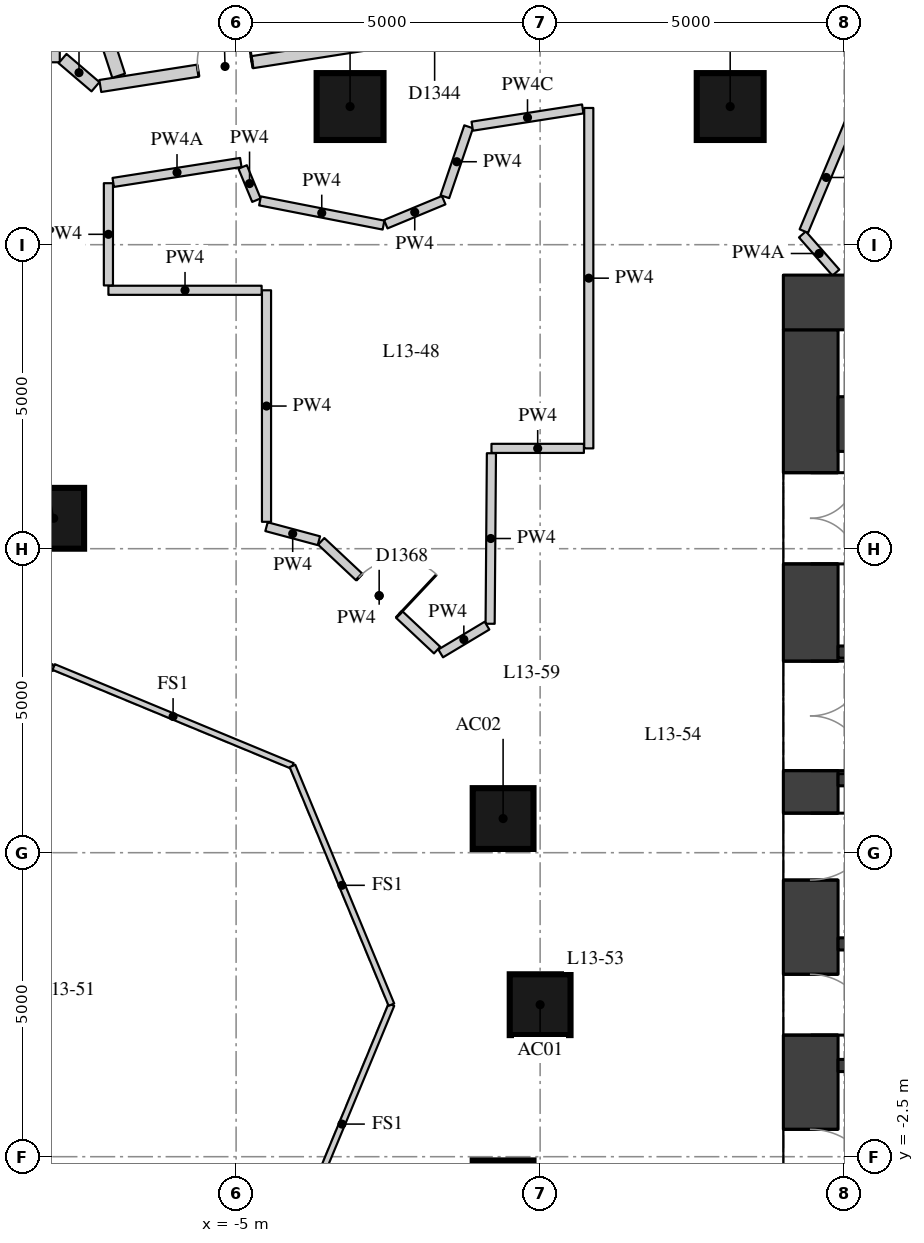
"""IFC4 building model, lengths in metres.
Left out: names, types, materials, properties, quantities, classifications, styles, units other than length and angle.
Written with IfcOpenShell. Run it as: python <this file> out.ifc"""

import sys

from ifc_helpers import new_model, si_unit, direction, frame, frame_2d, origin, origin_2d, place, context, subcontext, project, spatial, rectangle, extrude, element, fill, save


model = new_model("IFC4")
c1 = context("Model", 3, precision=1e-05, world=origin(), true_north=direction((0.0, 1.0)))
c2 = subcontext(c1, "Body", "Model", "MODEL_VIEW")
j1 = project(units=[si_unit("LENGTHUNIT", "METRE"), si_unit("PLANEANGLEUNIT", "RADIAN")], contexts=[c1])
p1 = place(None, origin())
s1 = spatial("IfcSite", under=j1, at=p1, CompositionType="ELEMENT")
p2 = place(p1, origin())
s2 = spatial("IfcBuilding", under=s1, at=p2, CompositionType="ELEMENT")
p3 = place(p2, frame((0.0, 0.0, 51.4)))
s3 = spatial("IfcBuildingStorey", under=s2, at=p3, CompositionType="ELEMENT", Elevation=51.4)
for number, where, z_axis, x_axis in (
    (1, (0.0, 0.0, 0.0), (0.0, 0.0, 1.0), (1.0, 0.0, 0.0)),
    (2, (-0.609, 3.062, 0.0), (0.0, 0.0, 1.0), (1.0, 0.0, 0.0)),
    (3, (-8.0, 8.0, 0.0), (0.0, 0.0, 1.0), (1.0, 0.0, 0.0)),
    (4, (-0.609, -3.062, 0.0), (0.0, 0.0, 1.0), (1.0, 0.0, 0.0)),
):
    element("IfcColumn", number, at=place(p3, frame(where, z_axis=z_axis, x_axis=x_axis)), inside=s3, PredefinedType="COLUMN", context=c2, shape_type="SweptSolid", body=[
        extrude(rectangle(XDim=1.0, YDim=1.0, at=origin_2d()), origin(), (0.0, 0.0, 1.0), 3.3),
    ])
for number, where, z_axis, x_axis in (
    (5, (3.126, 14.772, 0.0), (0.0, 0.0, 1.0), (1.0, 0.0, 0.0)),
    (6, (-3.126, 14.772, 0.0), (0.0, 0.0, 1.0), (1.0, 0.0, 0.0)),
):
    element("IfcColumn", number, at=place(p3, frame(where, z_axis=z_axis, x_axis=x_axis)), inside=s3, PredefinedType="COLUMN", context=c2, shape_type="SweptSolid", body=[
        extrude(rectangle(XDim=1.1, YDim=1.1, at=origin_2d()), origin(), (0.0, 0.0, 1.0), 3.3),
    ])
p4 = place(p3, frame((4.45, -11.1, 0.0), z_axis=(0.0, 0.0, 1.0), x_axis=(0.0, 1.0, 0.0)))
e7 = element("IfcWall", 7, at=p4, inside=s3, PredefinedType="SHEAR", context=c2, shape_type="SweptSolid", body=[
    extrude(rectangle(XDim=22.2, YDim=0.9, at=frame_2d((11.1, 0.0))), origin(), (0.0, 0.0, 1.0), 3.02),
])
p5 = place(p4, frame((2.35, 0.0, 0.0)))
e8 = element("IfcOpeningElement", 8, at=p5, cuts=e7, PredefinedType="OPENING", context=c2, shape_type="SweptSolid", body=[
    extrude(rectangle(XDim=1.5, YDim=2.1, at=frame_2d((0.75, 1.05))), frame((0.0, 0.46, 0.0), z_axis=(0.0, -1.0, 0.0), x_axis=(1.0, 0.0, 0.0)), (0.0, 0.0, 1.0), 0.92),
])
p6 = place(p4, frame((5.45, 0.0, 0.0)))
e9 = element("IfcOpeningElement", 9, at=p6, cuts=e7, PredefinedType="OPENING", context=c2, shape_type="SweptSolid", body=[
    extrude(rectangle(XDim=1.8, YDim=2.1, at=frame_2d((0.9, 1.05))), frame((0.0, 0.46, 0.0), z_axis=(0.0, -1.0, 0.0), x_axis=(1.0, 0.0, 0.0)), (0.0, 0.0, 1.0), 0.92),
])
p7 = place(p4, frame((7.95, 0.0, 0.0)))
e10 = element("IfcOpeningElement", 10, at=p7, cuts=e7, PredefinedType="OPENING", context=c2, shape_type="SweptSolid", body=[
    extrude(rectangle(XDim=1.1, YDim=2.1, at=frame_2d((0.55, 1.05))), frame((0.0, 0.46, 0.0), z_axis=(0.0, -1.0, 0.0), x_axis=(1.0, 0.0, 0.0)), (0.0, 0.0, 1.0), 0.92),
])
p8 = place(p4, frame((10.6, 0.0, 0.0)))
e11 = element("IfcOpeningElement", 11, at=p8, cuts=e7, PredefinedType="OPENING", context=c2, shape_type="SweptSolid", body=[
    extrude(rectangle(XDim=1.0, YDim=2.1, at=frame_2d((0.5, 1.05))), frame((0.0, 0.46, 0.0), z_axis=(0.0, -1.0, 0.0), x_axis=(1.0, 0.0, 0.0)), (0.0, 0.0, 1.0), 0.92),
])
p9 = place(p4, frame((13.15, 0.0, 0.0)))
e12 = element("IfcOpeningElement", 12, at=p9, cuts=e7, PredefinedType="OPENING", context=c2, shape_type="SweptSolid", body=[
    extrude(rectangle(XDim=1.1, YDim=2.1, at=frame_2d((0.55, 1.05))), frame((0.0, 0.46, 0.0), z_axis=(0.0, -1.0, 0.0), x_axis=(1.0, 0.0, 0.0)), (0.0, 0.0, 1.0), 0.92),
])
p10 = place(p4, frame((14.95, 0.0, 0.0)))
e13 = element("IfcOpeningElement", 13, at=p10, cuts=e7, PredefinedType="OPENING", context=c2, shape_type="SweptSolid", body=[
    extrude(rectangle(XDim=1.8, YDim=2.1, at=frame_2d((0.9, 1.05))), frame((0.0, 0.46, 0.0), z_axis=(0.0, -1.0, 0.0), x_axis=(1.0, 0.0, 0.0)), (0.0, 0.0, 1.0), 0.92),
])
p11 = place(p4, frame((18.35, 0.0, 0.0)))
e14 = element("IfcOpeningElement", 14, at=p11, cuts=e7, PredefinedType="OPENING", context=c2, shape_type="SweptSolid", body=[
    extrude(rectangle(XDim=1.5, YDim=2.1, at=frame_2d((0.75, 1.05))), frame((0.0, 0.46, 0.0), z_axis=(0.0, -1.0, 0.0), x_axis=(1.0, 0.0, 0.0)), (0.0, 0.0, 1.0), 0.92),
])
p12 = place(p3, frame((4.0, 11.55, 0.0), z_axis=(0.0, 0.0, 1.0), x_axis=(1.0, 0.0, 0.0)))
e15 = element("IfcWall", 15, at=p12, inside=s3, PredefinedType="SHEAR", context=c2, shape_type="SweptSolid", body=[
    extrude(rectangle(XDim=15.2, YDim=0.9, at=frame_2d((7.6, 0.0))), origin(), (0.0, 0.0, 1.0), 3.02),
])
p13 = place(p3, frame((4.9, 9.55, 0.0), z_axis=(0.0, 0.0, 1.0), x_axis=(1.0, 0.0, 0.0)))
e16 = element("IfcWall", 16, at=p13, inside=s3, PredefinedType="SHEAR", context=c2, shape_type="SweptSolid", body=[
    extrude(rectangle(XDim=10.2, YDim=0.9, at=frame_2d((5.1, 0.0))), origin(), (0.0, 0.0, 1.0), 3.02),
])
p14 = place(p3, frame((4.9, 5.8, 0.0), z_axis=(0.0, 0.0, 1.0), x_axis=(1.0, 0.0, 0.0)))
e17 = element("IfcWall", 17, at=p14, inside=s3, PredefinedType="SHEAR", context=c2, shape_type="SweptSolid", body=[
    extrude(rectangle(XDim=10.2, YDim=0.2, at=frame_2d((5.1, 0.0))), origin(), (0.0, 0.0, 1.0), 3.02),
])
p15 = place(p14, frame((6.75, 0.0, 0.0)))
e18 = element("IfcOpeningElement", 18, at=p15, cuts=e17, PredefinedType="OPENING", context=c2, shape_type="SweptSolid", body=[
    extrude(rectangle(XDim=1.1, YDim=2.1, at=frame_2d((0.55, 1.05))), frame((0.0, 0.11, 0.0), z_axis=(0.0, -1.0, 0.0), x_axis=(1.0, 0.0, 0.0)), (0.0, 0.0, 1.0), 0.22),
])
p16 = place(p14, frame((8.75, 0.0, 0.0)))
e19 = element("IfcOpeningElement", 19, at=p16, cuts=e17, PredefinedType="OPENING", context=c2, shape_type="SweptSolid", body=[
    extrude(rectangle(XDim=1.1, YDim=2.1, at=frame_2d((0.55, 1.05))), frame((0.0, 0.11, 0.0), z_axis=(0.0, -1.0, 0.0), x_axis=(1.0, 0.0, 0.0)), (0.0, 0.0, 1.0), 0.22),
])
p17 = place(p3, frame((4.9, 3.7, 0.0), z_axis=(0.0, 0.0, 1.0), x_axis=(1.0, 0.0, 0.0)))
e20 = element("IfcWall", 20, at=p17, inside=s3, PredefinedType="SHEAR", context=c2, shape_type="SweptSolid", body=[
    extrude(rectangle(XDim=10.2, YDim=0.2, at=frame_2d((5.1, 0.0))), origin(), (0.0, 0.0, 1.0), 3.02),
])
p18 = place(p17, frame((6.3, 0.0, 0.0)))
e21 = element("IfcOpeningElement", 21, at=p18, cuts=e20, PredefinedType="OPENING", context=c2, shape_type="SweptSolid", body=[
    extrude(rectangle(XDim=1.1, YDim=2.1, at=frame_2d((0.55, 1.05))), frame((0.0, 0.11, 0.0), z_axis=(0.0, -1.0, 0.0), x_axis=(1.0, 0.0, 0.0)), (0.0, 0.0, 1.0), 0.22),
])
p19 = place(p17, frame((8.6, 0.0, 0.0)))
e22 = element("IfcOpeningElement", 22, at=p19, cuts=e20, PredefinedType="OPENING", context=c2, shape_type="SweptSolid", body=[
    extrude(rectangle(XDim=1.1, YDim=2.1, at=frame_2d((0.55, 1.05))), frame((0.0, 0.11, 0.0), z_axis=(0.0, -1.0, 0.0), x_axis=(1.0, 0.0, 0.0)), (0.0, 0.0, 1.0), 0.22),
])
for number, where, z_axis, x_axis in (
    (23, (4.9, 1.0, 0.0), (0.0, 0.0, 1.0), (1.0, 0.0, 0.0)),
    (24, (4.9, -1.0, 0.0), (0.0, 0.0, 1.0), (1.0, 0.0, 0.0)),
):
    element("IfcWall", number, at=place(p3, frame(where, z_axis=z_axis, x_axis=x_axis)), inside=s3, PredefinedType="SHEAR", context=c2, shape_type="SweptSolid", body=[
        extrude(rectangle(XDim=10.2, YDim=0.2, at=frame_2d((5.1, 0.0))), origin(), (0.0, 0.0, 1.0), 3.02),
    ])
p20 = place(p3, frame((-15.531, 15.6, 0.0), z_axis=(0.0, 0.0, 1.0), x_axis=(1.0, 0.0, 0.0)))
e25 = element("IfcWall", 25, at=p20, inside=s3, PredefinedType="PARTITIONING", context=c2, shape_type="SweptSolid", body=[
    extrude(rectangle(XDim=7.632, YDim=0.2, at=frame_2d((3.816, 0.0))), origin(), (0.0, 0.0, 1.0), 3.02),
])
p21 = place(p20, frame((5.283, 0.0, 0.0)))
e26 = element("IfcOpeningElement", 26, at=p21, cuts=e25, PredefinedType="OPENING", context=c2, shape_type="SweptSolid", body=[
    extrude(rectangle(XDim=1.0, YDim=2.1, at=frame_2d((0.5, 1.05))), frame((0.0, 0.11, 0.0), z_axis=(0.0, -1.0, 0.0), x_axis=(1.0, 0.0, 0.0)), (0.0, 0.0, 1.0), 0.22),
])
p22 = place(p20, frame((0.451, 0.0, 0.0)))
e27 = element("IfcOpeningElement", 27, at=p22, cuts=e25, PredefinedType="OPENING", context=c2, shape_type="SweptSolid", body=[
    extrude(rectangle(XDim=1.1, YDim=2.1, at=frame_2d((0.55, 1.05))), frame((0.0, 0.11, 0.0), z_axis=(0.0, -1.0, 0.0), x_axis=(1.0, 0.0, 0.0)), (0.0, 0.0, 1.0), 0.22),
])
p23 = place(p3, frame((-7.854, 15.561, 0.0), z_axis=(0.0, 0.0, 1.0), x_axis=(0.759763914627, -0.650199041856, 0.0)))
e28 = element("IfcWall", 28, at=p23, inside=s3, PredefinedType="PARTITIONING", context=c2, shape_type="SweptSolid", body=[
    extrude(rectangle(XDim=0.713, YDim=0.2, at=frame_2d((0.356, 0.0))), origin(), (0.0, 0.0, 1.0), 3.02),
])
p24 = place(p3, frame((-7.234, 15.11, 0.0), z_axis=(0.0, 0.0, 1.0), x_axis=(0.987957763282, 0.154723811906, 0.0)))
e29 = element("IfcWall", 29, at=p24, inside=s3, PredefinedType="PARTITIONING", context=c2, shape_type="SweptSolid", body=[
    extrude(rectangle(XDim=11.012, YDim=0.2, at=frame_2d((5.506, 0.0))), origin(), (0.0, 0.0, 1.0), 3.02),
])
p25 = place(p24, frame((8.605, 0.0, 0.0)))
e30 = element("IfcOpeningElement", 30, at=p25, cuts=e29, PredefinedType="OPENING", context=c2, shape_type="SweptSolid", body=[
    extrude(rectangle(XDim=0.9, YDim=2.1, at=frame_2d((0.45, 1.05))), frame((0.0, 0.11, 0.0), z_axis=(0.0, -1.0, 0.0), x_axis=(1.0, 0.0, 0.0)), (0.0, 0.0, 1.0), 0.22),
])
p26 = place(p24, frame((5.116, 0.0, 0.0)))
e31 = element("IfcOpeningElement", 31, at=p26, cuts=e29, PredefinedType="OPENING", context=c2, shape_type="SweptSolid", body=[
    extrude(rectangle(XDim=0.9, YDim=2.1, at=frame_2d((0.45, 1.05))), frame((0.0, 0.11, 0.0), z_axis=(0.0, -1.0, 0.0), x_axis=(1.0, 0.0, 0.0)), (0.0, 0.0, 1.0), 0.22),
])
p27 = place(p24, frame((1.626, 0.0, 0.0)))
e32 = element("IfcOpeningElement", 32, at=p27, cuts=e29, PredefinedType="OPENING", context=c2, shape_type="SweptSolid", body=[
    extrude(rectangle(XDim=0.9, YDim=2.1, at=frame_2d((0.45, 1.05))), frame((0.0, 0.11, 0.0), z_axis=(0.0, -1.0, 0.0), x_axis=(1.0, 0.0, 0.0)), (0.0, 0.0, 1.0), 0.22),
])
p28 = place(p3, frame((3.739, 16.776, 0.0), z_axis=(0.0, 0.0, 1.0), x_axis=(0.923364778497, -0.383923802117, 0.0)))
e33 = element("IfcWall", 33, at=p28, inside=s3, PredefinedType="PARTITIONING", context=c2, shape_type="SweptSolid", body=[
    extrude(rectangle(XDim=8.273, YDim=0.2, at=frame_2d((4.137, 0.0))), origin(), (0.0, 0.0, 1.0), 3.02),
])
p29 = place(p28, frame((6.153, 0.0, 0.0)))
e34 = element("IfcOpeningElement", 34, at=p29, cuts=e33, PredefinedType="OPENING", context=c2, shape_type="SweptSolid", body=[
    extrude(rectangle(XDim=1.1, YDim=2.1, at=frame_2d((0.55, 1.05))), frame((0.0, 0.11, 0.0), z_axis=(0.0, -1.0, 0.0), x_axis=(1.0, 0.0, 0.0)), (0.0, 0.0, 1.0), 0.22),
])
p30 = place(p28, frame((1.298, 0.0, 0.0)))
e35 = element("IfcOpeningElement", 35, at=p30, cuts=e33, PredefinedType="OPENING", context=c2, shape_type="SweptSolid", body=[
    extrude(rectangle(XDim=0.9, YDim=2.1, at=frame_2d((0.45, 1.05))), frame((0.0, 0.11, 0.0), z_axis=(0.0, -1.0, 0.0), x_axis=(1.0, 0.0, 0.0)), (0.0, 0.0, 1.0), 0.22),
])
p31 = place(p3, frame((0.8, 14.749, 0.0), z_axis=(0.0, 0.0, 1.0), x_axis=(0.0, -1.0, 0.0)))
e36 = element("IfcWall", 36, at=p31, inside=s3, PredefinedType="PARTITIONING", context=c2, shape_type="SweptSolid", body=[
    extrude(rectangle(XDim=5.599, YDim=0.15, at=frame_2d((2.799, 0.0))), origin(), (0.0, 0.0, 1.0), 3.02),
])
p32 = place(p3, frame((0.72, 9.15, 0.0), z_axis=(0.0, 0.0, 1.0), x_axis=(-1.0, 0.0, 0.0)))
e37 = element("IfcWall", 37, at=p32, inside=s3, PredefinedType="PARTITIONING", context=c2, shape_type="SweptSolid", body=[
    extrude(rectangle(XDim=1.52, YDim=0.15, at=frame_2d((0.76, 0.0))), origin(), (0.0, 0.0, 1.0), 3.02),
])
p33 = place(p3, frame((-0.801, 9.07, 0.0), z_axis=(0.0, 0.0, 1.0), x_axis=(-0.007572902619, -0.999971325162, 0.0)))
e38 = element("IfcWall", 38, at=p33, inside=s3, PredefinedType="PARTITIONING", context=c2, shape_type="SweptSolid", body=[
    extrude(rectangle(XDim=2.805, YDim=0.15, at=frame_2d((1.402, 0.0))), origin(), (0.0, 0.0, 1.0), 3.02),
])
p34 = place(p3, frame((-0.874, 6.234, 0.0), z_axis=(0.0, 0.0, 1.0), x_axis=(-0.857759476535, -0.514051242984, 0.0)))
e39 = element("IfcWall", 39, at=p34, inside=s3, PredefinedType="PARTITIONING", context=c2, shape_type="SweptSolid", body=[
    extrude(rectangle(XDim=0.889, YDim=0.15, at=frame_2d((0.444, 0.0))), origin(), (0.0, 0.0, 1.0), 3.02),
])
p35 = place(p3, frame((-1.694, 5.832, 0.0), z_axis=(0.0, 0.0, 1.0), x_axis=(-0.729170056034, 0.684332542981, 0.0)))
e40 = element("IfcWall", 40, at=p35, inside=s3, PredefinedType="PARTITIONING", context=c2, shape_type="SweptSolid", body=[
    extrude(rectangle(XDim=2.614, YDim=0.15, at=frame_2d((1.307, 0.0))), origin(), (0.0, 0.0, 1.0), 3.02),
])
p36 = place(p35, frame((0.857, 0.0, 0.0)))
e41 = element("IfcOpeningElement", 41, at=p36, cuts=e40, PredefinedType="OPENING", context=c2, shape_type="SweptSolid", body=[
    extrude(rectangle(XDim=0.9, YDim=2.1, at=frame_2d((0.45, 1.05))), frame((0.0, 0.085, 0.0), z_axis=(0.0, -1.0, 0.0), x_axis=(1.0, 0.0, 0.0)), (0.0, 0.0, 1.0), 0.17),
])
p37 = place(p3, frame((-3.639, 7.631, 0.0), z_axis=(0.0, 0.0, 1.0), x_axis=(-0.965879594242, 0.258991523853, 0.0)))
e42 = element("IfcWall", 42, at=p37, inside=s3, PredefinedType="PARTITIONING", context=c2, shape_type="SweptSolid", body=[
    extrude(rectangle(XDim=0.892, YDim=0.15, at=frame_2d((0.446, 0.0))), origin(), (0.0, 0.0, 1.0), 3.02),
])
p38 = place(p3, frame((-4.5, 7.942, 0.0), z_axis=(0.0, 0.0, 1.0), x_axis=(0.0, 1.0, 0.0)))
e43 = element("IfcWall", 43, at=p38, inside=s3, PredefinedType="PARTITIONING", context=c2, shape_type="SweptSolid", body=[
    extrude(rectangle(XDim=3.808, YDim=0.15, at=frame_2d((1.904, 0.0))), origin(), (0.0, 0.0, 1.0), 3.02),
])
p39 = place(p3, frame((-4.58, 11.75, 0.0), z_axis=(0.0, 0.0, 1.0), x_axis=(-1.0, 0.0, 0.0)))
e44 = element("IfcWall", 44, at=p39, inside=s3, PredefinedType="PARTITIONING", context=c2, shape_type="SweptSolid", body=[
    extrude(rectangle(XDim=2.52, YDim=0.15, at=frame_2d((1.26, 0.0))), origin(), (0.0, 0.0, 1.0), 3.02),
])
p40 = place(p3, frame((-7.1, 11.83, 0.0), z_axis=(0.0, 0.0, 1.0), x_axis=(0.0, 1.0, 0.0)))
e45 = element("IfcWall", 45, at=p40, inside=s3, PredefinedType="PARTITIONING", context=c2, shape_type="SweptSolid", body=[
    extrude(rectangle(XDim=1.681, YDim=0.15, at=frame_2d((0.841, 0.0))), origin(), (0.0, 0.0, 1.0), 3.02),
])
p41 = place(p3, frame((-7.021, 13.524, 0.0), z_axis=(0.0, 0.0, 1.0), x_axis=(0.987976394461, 0.154604799366, 0.0)))
e46 = element("IfcWall", 46, at=p41, inside=s3, PredefinedType="PARTITIONING", context=c2, shape_type="SweptSolid", body=[
    extrude(rectangle(XDim=2.124, YDim=0.15, at=frame_2d((1.062, 0.0))), origin(), (0.0, 0.0, 1.0), 2.57),
])
p42 = place(p3, frame((-4.892, 13.778, 0.0), z_axis=(0.0, 0.0, 1.0), x_axis=(0.383178293395, -0.923674399056, 0.0)))
e47 = element("IfcWall", 47, at=p42, inside=s3, PredefinedType="PARTITIONING", context=c2, shape_type="SweptSolid", body=[
    extrude(rectangle(XDim=0.591, YDim=0.15, at=frame_2d((0.296, 0.0))), origin(), (0.0, 0.0, 1.0), 3.02),
])
p43 = place(p3, frame((-4.607, 13.22, 0.0), z_axis=(0.0, 0.0, 1.0), x_axis=(0.981304142817, -0.192463449234, 0.0)))
e48 = element("IfcWall", 48, at=p43, inside=s3, PredefinedType="PARTITIONING", context=c2, shape_type="SweptSolid", body=[
    extrude(rectangle(XDim=2.07, YDim=0.15, at=frame_2d((1.035, 0.0))), origin(), (0.0, 0.0, 1.0), 3.02),
])
p44 = place(p3, frame((-2.539, 12.837, 0.0), z_axis=(0.0, 0.0, 1.0), x_axis=(0.923768662954, 0.382950985565, 0.0)))
e49 = element("IfcWall", 49, at=p44, inside=s3, PredefinedType="PARTITIONING", context=c2, shape_type="SweptSolid", body=[
    extrude(rectangle(XDim=1.031, YDim=0.15, at=frame_2d((0.516, 0.0))), origin(), (0.0, 0.0, 1.0), 3.02),
])
p45 = place(p3, frame((-1.567, 13.289, 0.0), z_axis=(0.0, 0.0, 1.0), x_axis=(0.321769415776, 0.946818062286, 0.0)))
e50 = element("IfcWall", 50, at=p45, inside=s3, PredefinedType="PARTITIONING", context=c2, shape_type="SweptSolid", body=[
    extrude(rectangle(XDim=1.215, YDim=0.15, at=frame_2d((0.607, 0.0))), origin(), (0.0, 0.0, 1.0), 3.02),
])
p46 = place(p3, frame((-1.116, 14.449, 0.0), z_axis=(0.0, 0.0, 1.0), x_axis=(0.988017726025, 0.154340445315, 0.0)))
e51 = element("IfcWall", 51, at=p46, inside=s3, PredefinedType="PARTITIONING", context=c2, shape_type="SweptSolid", body=[
    extrude(rectangle(XDim=1.84, YDim=0.15, at=frame_2d((0.92, 0.0))), origin(), (0.0, 0.0, 1.0), 2.42),
])
p47 = place(p3, frame((4.865, 12.042, 0.0), z_axis=(0.0, 0.0, 1.0), x_axis=(-0.660014599896, 0.751252772323, 0.0)))
e52 = element("IfcWall", 52, at=p47, inside=s3, PredefinedType="PARTITIONING", context=c2, shape_type="SweptSolid", body=[
    extrude(rectangle(XDim=0.835, YDim=0.15, at=frame_2d((0.417, 0.0))), origin(), (0.0, 0.0, 1.0), 2.57),
])
p48 = place(p3, frame((4.337, 12.724, 0.0), z_axis=(0.0, 0.0, 1.0), x_axis=(0.386537433901, 0.922273718694, 0.0)))
e53 = element("IfcWall", 53, at=p48, inside=s3, PredefinedType="PARTITIONING", context=c2, shape_type="SweptSolid", body=[
    extrude(rectangle(XDim=1.911, YDim=0.15, at=frame_2d((0.956, 0.0))), origin(), (0.0, 0.0, 1.0), 3.02),
])
p49 = place(p3, frame((-9.034, 21.721, 0.0), z_axis=(0.0, 0.0, 1.0), x_axis=(0.310212430052, -0.950667264736, 0.0)))
e54 = element("IfcWall", 54, at=p49, inside=s3, PredefinedType="PARTITIONING", context=c2, shape_type="SweptSolid", body=[
    extrude(rectangle(XDim=6.777, YDim=0.22, at=frame_2d((3.388, 0.0))), origin(), (0.0, 0.0, 1.0), 3.02),
])
for number, where, z_axis, x_axis in (
    (55, (-2.446, 0.0, 0.0), (0.0, 0.0, 1.0), (-0.383, -0.924, 0.0)),
    (56, (-11.927, 3.927, 0.0), (0.0, 0.0, 1.0), (0.924, 0.383, 0.0)),
    (57, (-8.0, 5.554, 0.0), (0.0, 0.0, 1.0), (0.924, -0.383, 0.0)),
    (58, (-4.073, 3.927, 0.0), (0.0, 0.0, 1.0), (0.383, -0.924, 0.0)),
):
    element("IfcWall", number, at=place(p3, frame(where, z_axis=z_axis, x_axis=x_axis)), inside=s3, PredefinedType="PARTITIONING", context=c2, shape_type="SweptSolid", body=[
        extrude(rectangle(XDim=4.251, YDim=0.1, at=frame_2d((2.125, 0.0))), origin(), (0.0, 0.0, 1.0), 3.02),
    ])
p50 = place(p7, origin())
e59 = element("IfcDoor", 59, at=p50, inside=s3, OperationType="SINGLE_SWING_RIGHT", PredefinedType="DOOR", context=c2, shape_type="SweptSolid", body=[
    extrude(rectangle(XDim=1.1, YDim=2.1, at=frame_2d((0.55, 1.05))), frame((0.0, 0.025, 0.0), z_axis=(0.0, -1.0, 0.0), x_axis=(1.0, 0.0, 0.0)), (0.0, 0.0, 1.0), 0.05),
])
fill(e10, e59)
p51 = place(p8, origin())
e60 = element("IfcDoor", 60, at=p51, inside=s3, OperationType="SINGLE_SWING_RIGHT", PredefinedType="DOOR", context=c2, shape_type="SweptSolid", body=[
    extrude(rectangle(XDim=1.0, YDim=2.1, at=frame_2d((0.5, 1.05))), frame((0.0, 0.025, 0.0), z_axis=(0.0, -1.0, 0.0), x_axis=(1.0, 0.0, 0.0)), (0.0, 0.0, 1.0), 0.05),
])
fill(e11, e60)
p52 = place(p9, origin())
e61 = element("IfcDoor", 61, at=p52, inside=s3, OperationType="SINGLE_SWING_LEFT", PredefinedType="DOOR", context=c2, shape_type="SweptSolid", body=[
    extrude(rectangle(XDim=1.1, YDim=2.1, at=frame_2d((0.55, 1.05))), frame((0.0, 0.025, 0.0), z_axis=(0.0, -1.0, 0.0), x_axis=(1.0, 0.0, 0.0)), (0.0, 0.0, 1.0), 0.05),
])
fill(e12, e61)
p53 = place(p10, origin())
e62 = element("IfcDoor", 62, at=p53, inside=s3, OperationType="DOUBLE_DOOR_SINGLE_SWING", PredefinedType="DOOR", context=c2, shape_type="SweptSolid", body=[
    extrude(rectangle(XDim=1.8, YDim=2.1, at=frame_2d((0.9, 1.05))), frame((0.0, 0.025, 0.0), z_axis=(0.0, -1.0, 0.0), x_axis=(1.0, 0.0, 0.0)), (0.0, 0.0, 1.0), 0.05),
])
fill(e13, e62)
p54 = place(p11, origin())
e63 = element("IfcDoor", 63, at=p54, inside=s3, OperationType="DOUBLE_DOOR_SINGLE_SWING", PredefinedType="DOOR", context=c2, shape_type="SweptSolid", body=[
    extrude(rectangle(XDim=1.5, YDim=2.1, at=frame_2d((0.75, 1.05))), frame((0.0, 0.025, 0.0), z_axis=(0.0, -1.0, 0.0), x_axis=(1.0, 0.0, 0.0)), (0.0, 0.0, 1.0), 0.05),
])
fill(e14, e63)
p55 = place(p27, origin())
e64 = element("IfcDoor", 64, at=p55, inside=s3, OperationType="SINGLE_SWING_RIGHT", PredefinedType="DOOR", context=c2, shape_type="SweptSolid", body=[
    extrude(rectangle(XDim=0.9, YDim=2.1, at=frame_2d((0.45, 1.05))), frame((0.0, 0.025, 0.0), z_axis=(0.0, -1.0, 0.0), x_axis=(1.0, 0.0, 0.0)), (0.0, 0.0, 1.0), 0.05),
])
fill(e32, e64)
p56 = place(p36, origin())
e65 = element("IfcDoor", 65, at=p56, inside=s3, OperationType="SINGLE_SWING_RIGHT", PredefinedType="DOOR", context=c2, shape_type="SweptSolid", body=[
    extrude(rectangle(XDim=0.9, YDim=2.1, at=frame_2d((0.45, 1.05))), frame((0.0, 0.025, 0.0), z_axis=(0.0, -1.0, 0.0), x_axis=(1.0, 0.0, 0.0)), (0.0, 0.0, 1.0), 0.05),
])
fill(e41, e65)
save(model, sys.argv[1])
